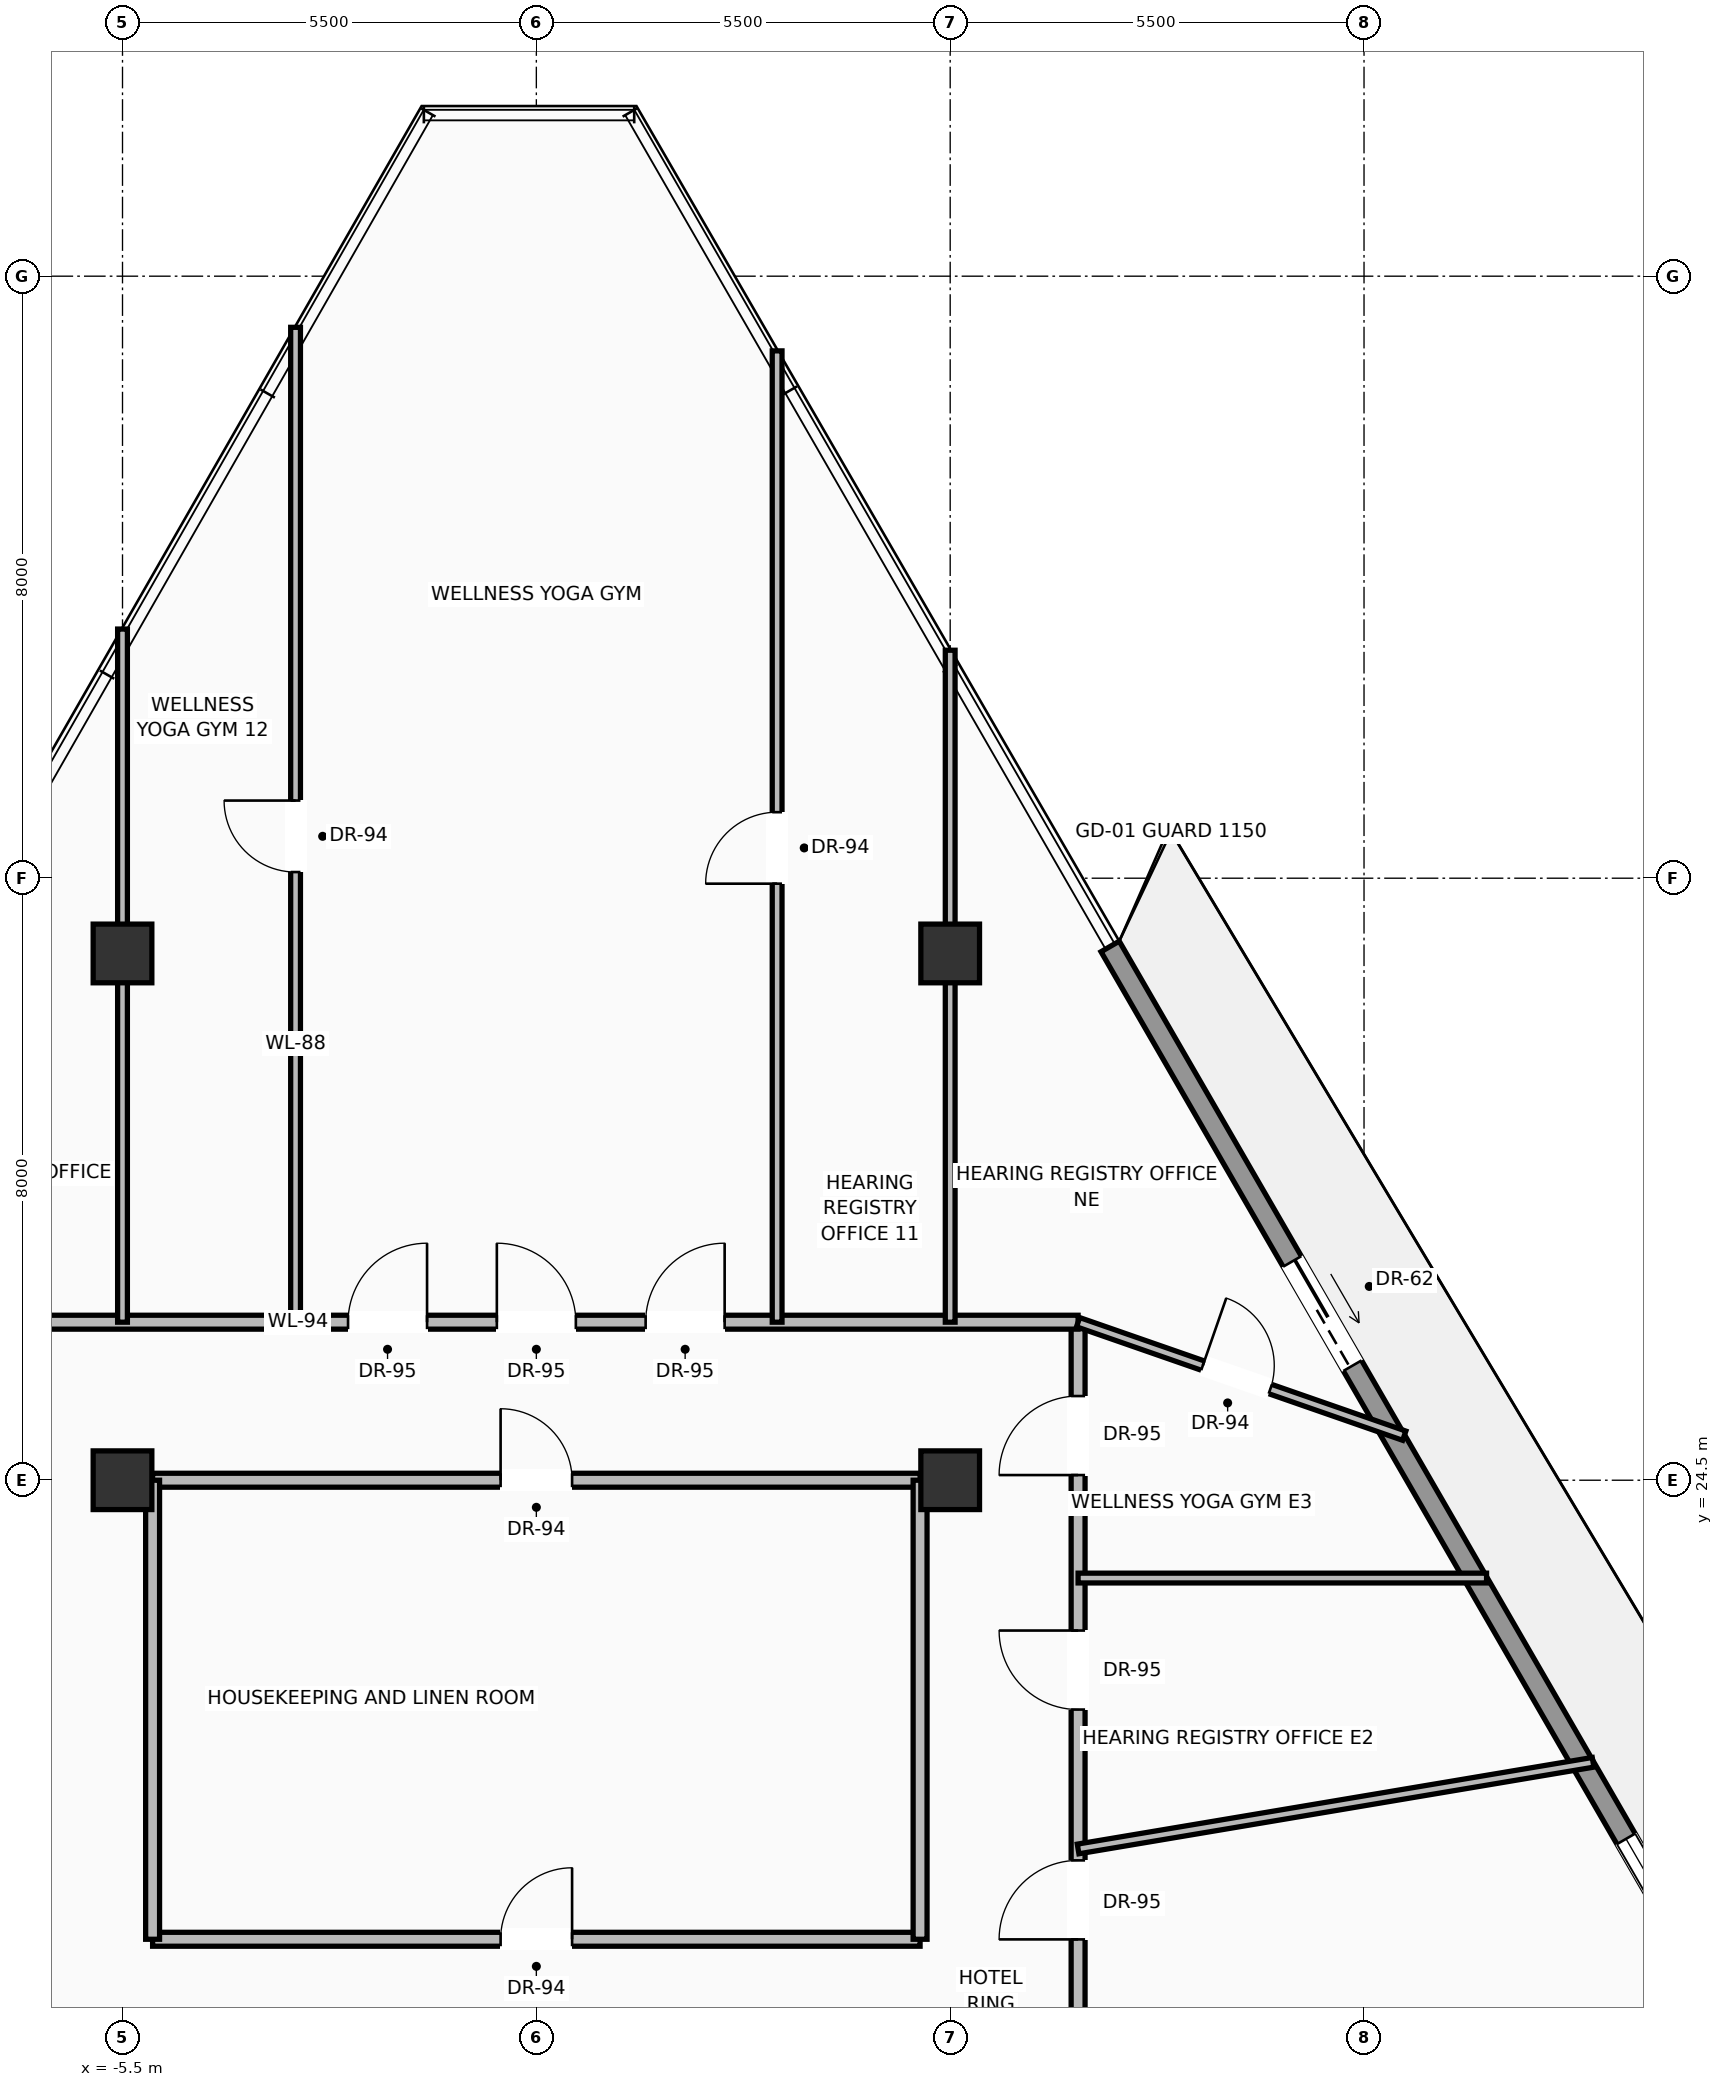
"""IFC4 building model, lengths in metres.
Left out: names, types, materials, properties, quantities, classifications, styles, units other than length and angle.
Written with IfcOpenShell. Run it as: python <this file> out.ifc"""

import sys

from ifc_helpers import new_model, si_unit, direction, frame, frame_2d, origin, origin_2d, place, context, subcontext, project, spatial, rectangle, extrude, source, transform, mapped, element, fill, save


model = new_model("IFC4")
c1 = context("Model", 3, precision=1e-05, world=origin(), true_north=direction((0.0, 1.0)))
c2 = subcontext(c1, "Body", "Model", "MODEL_VIEW")
j1 = project(units=[si_unit("LENGTHUNIT", "METRE"), si_unit("PLANEANGLEUNIT", "RADIAN")], contexts=[c1])
p1 = place(None, origin())
s1 = spatial("IfcSite", under=j1, at=p1, CompositionType="ELEMENT")
p2 = place(p1, origin())
s2 = spatial("IfcBuilding", under=s1, at=p2, CompositionType="ELEMENT")
p3 = place(p2, frame((0.0, 0.0, 293.7)))
s3 = spatial("IfcBuildingStorey", under=s2, at=p3, CompositionType="ELEMENT", Elevation=293.7)
m1 = source(origin(), c2, "Body", "SweptSolid", [
    extrude(rectangle(XDim=0.78, YDim=0.78, at=origin_2d()), origin(), (0.0, 0.0, 1.0), 3.45),
])
for number, where, z_axis, x_axis in (
    (1, (-5.5, 24.5, 0.0), (0.0, 0.0, 1.0), (1.0, 0.0, 0.0)),
    (2, (5.5, 24.5, 0.0), (0.0, 0.0, 1.0), (1.0, 0.0, 0.0)),
    (3, (-5.5, 31.5, 0.0), (0.0, 0.0, 1.0), (1.0, 0.0, 0.0)),
    (4, (5.5, 31.5, 0.0), (0.0, 0.0, 1.0), (1.0, 0.0, 0.0)),
):
    element("IfcColumn", number, at=place(p3, frame(where, z_axis=z_axis, x_axis=x_axis)), inside=s3, PredefinedType="COLUMN", context=c2, shape_type="MappedRepresentation", body=[
        mapped(m1, transform((0.0, 0.0, 0.0), scale=1.0)),
    ])
p4 = place(p3, frame((7.626, 31.593, 0.0), z_axis=(0.0, 0.0, 1.0), x_axis=(0.500533605719, -0.865717107112, 0.0)))
e5 = element("IfcWall", 5, at=p4, inside=s3, PredefinedType="SOLIDWALL", context=c2, shape_type="SweptSolid", body=[
    extrude(rectangle(XDim=20.145, YDim=0.28, at=frame_2d((10.072, 0.0))), origin(), (0.0, 0.0, 1.0), 2.82),
])
p5 = place(p4, frame((4.835, 0.0, 0.0)))
e6 = element("IfcOpeningElement", 6, at=p5, cuts=e5, PredefinedType="OPENING", context=c2, shape_type="SweptSolid", body=[
    extrude(rectangle(XDim=1.6, YDim=2.35, at=frame_2d((0.8, 1.175))), frame((0.0, 0.15, 0.0), z_axis=(0.0, -1.0, 0.0), x_axis=(1.0, 0.0, 0.0)), (0.0, 0.0, 1.0), 0.3),
])
p6 = place(p4, frame((13.698, 0.0, 0.9)))
e7 = element("IfcOpeningElement", 7, at=p6, cuts=e5, PredefinedType="OPENING", context=c2, shape_type="SweptSolid", body=[
    extrude(rectangle(XDim=1.55, YDim=1.75, at=frame_2d((0.775, 0.875))), frame((0.0, 0.15, 0.0), z_axis=(0.0, -1.0, 0.0), x_axis=(1.0, 0.0, 0.0)), (0.0, 0.0, 1.0), 0.3),
])
p7 = place(p3, frame((-5.1, 18.4, 0.0), z_axis=(0.0, 0.0, 1.0), x_axis=(1.0, 0.0, 0.0)))
e8 = element("IfcWall", 8, at=p7, inside=s3, PredefinedType="PARTITIONING", context=c2, shape_type="SweptSolid", body=[
    extrude(rectangle(XDim=10.2, YDim=0.185, at=frame_2d((5.1, 0.0))), origin(), (0.0, 0.0, 1.0), 3.232),
])
p8 = place(p7, frame((4.625, 0.0, 0.0)))
e9 = element("IfcOpeningElement", 9, at=p8, cuts=e8, PredefinedType="OPENING", context=c2, shape_type="SweptSolid", body=[
    extrude(rectangle(XDim=0.95, YDim=2.2, at=frame_2d((0.475, 1.1))), frame((0.0, 0.103, 0.0), z_axis=(0.0, -1.0, 0.0), x_axis=(1.0, 0.0, 0.0)), (0.0, 0.0, 1.0), 0.205),
])
p9 = place(p3, frame((-5.1, 24.5, 0.0), z_axis=(0.0, 0.0, 1.0), x_axis=(1.0, 0.0, 0.0)))
e10 = element("IfcWall", 10, at=p9, inside=s3, PredefinedType="PARTITIONING", context=c2, shape_type="SweptSolid", body=[
    extrude(rectangle(XDim=10.2, YDim=0.185, at=frame_2d((5.1, 0.0))), origin(), (0.0, 0.0, 1.0), 2.683),
])
p10 = place(p9, frame((4.625, 0.0, 0.0)))
e11 = element("IfcOpeningElement", 11, at=p10, cuts=e10, PredefinedType="OPENING", context=c2, shape_type="SweptSolid", body=[
    extrude(rectangle(XDim=0.95, YDim=2.2, at=frame_2d((0.475, 1.1))), frame((0.0, 0.103, 0.0), z_axis=(0.0, -1.0, 0.0), x_axis=(1.0, 0.0, 0.0)), (0.0, 0.0, 1.0), 0.205),
])
for number, where, z_axis, x_axis in (
    (12, (-5.1, 18.4, 0.0), (0.0, 0.0, 1.0), (0.0, 1.0, 0.0)),
    (13, (5.1, 18.4, 0.0), (0.0, 0.0, 1.0), (0.0, 1.0, 0.0)),
):
    element("IfcWall", number, at=place(p3, frame(where, z_axis=z_axis, x_axis=x_axis)), inside=s3, PredefinedType="PARTITIONING", context=c2, shape_type="SweptSolid", body=[
        extrude(rectangle(XDim=6.1, YDim=0.185, at=frame_2d((3.05, 0.0))), origin(), (0.0, 0.0, 1.0), 3.232),
    ])
p11 = place(p3, frame((7.2, 16.2, 0.0), z_axis=(0.0, 0.0, 1.0), x_axis=(0.0, 1.0, 0.0)))
e14 = element("IfcWall", 14, at=p11, inside=s3, PredefinedType="PARTITIONING", context=c2, shape_type="SweptSolid", body=[
    extrude(rectangle(XDim=10.4, YDim=0.185, at=frame_2d((5.2, 0.0))), origin(), (0.0, 0.0, 1.0), 3.232),
])
p12 = place(p11, frame((2.198, 0.0, 0.0)))
e15 = element("IfcOpeningElement", 15, at=p12, cuts=e14, PredefinedType="OPENING", context=c2, shape_type="SweptSolid", body=[
    extrude(rectangle(XDim=1.05, YDim=2.25, at=frame_2d((0.525, 1.125))), frame((0.0, 0.103, 0.0), z_axis=(0.0, -1.0, 0.0), x_axis=(1.0, 0.0, 0.0)), (0.0, 0.0, 1.0), 0.205),
])
p13 = place(p11, frame((5.252, 0.0, 0.0)))
e16 = element("IfcOpeningElement", 16, at=p13, cuts=e14, PredefinedType="OPENING", context=c2, shape_type="SweptSolid", body=[
    extrude(rectangle(XDim=1.05, YDim=2.25, at=frame_2d((0.525, 1.125))), frame((0.0, 0.103, 0.0), z_axis=(0.0, -1.0, 0.0), x_axis=(1.0, 0.0, 0.0)), (0.0, 0.0, 1.0), 0.205),
])
p14 = place(p11, frame((8.369, 0.0, 0.0)))
e17 = element("IfcOpeningElement", 17, at=p14, cuts=e14, PredefinedType="OPENING", context=c2, shape_type="SweptSolid", body=[
    extrude(rectangle(XDim=1.05, YDim=2.25, at=frame_2d((0.525, 1.125))), frame((0.0, 0.103, 0.0), z_axis=(0.0, -1.0, 0.0), x_axis=(1.0, 0.0, 0.0)), (0.0, 0.0, 1.0), 0.205),
])
p15 = place(p3, frame((-7.2, 26.6, 0.0), z_axis=(0.0, 0.0, 1.0), x_axis=(1.0, 0.0, 0.0)))
e18 = element("IfcWall", 18, at=p15, inside=s3, PredefinedType="PARTITIONING", context=c2, shape_type="SweptSolid", body=[
    extrude(rectangle(XDim=14.4, YDim=0.185, at=frame_2d((7.2, 0.0))), origin(), (0.0, 0.0, 1.0), 3.232),
])
p16 = place(p15, frame((4.698, 0.0, 0.0)))
e19 = element("IfcOpeningElement", 19, at=p16, cuts=e18, PredefinedType="OPENING", context=c2, shape_type="SweptSolid", body=[
    extrude(rectangle(XDim=1.05, YDim=2.25, at=frame_2d((0.525, 1.125))), frame((0.0, 0.103, 0.0), z_axis=(0.0, -1.0, 0.0), x_axis=(1.0, 0.0, 0.0)), (0.0, 0.0, 1.0), 0.205),
])
p17 = place(p15, frame((6.675, 0.0, 0.0)))
e20 = element("IfcOpeningElement", 20, at=p17, cuts=e18, PredefinedType="OPENING", context=c2, shape_type="SweptSolid", body=[
    extrude(rectangle(XDim=1.05, YDim=2.25, at=frame_2d((0.525, 1.125))), frame((0.0, 0.103, 0.0), z_axis=(0.0, -1.0, 0.0), x_axis=(1.0, 0.0, 0.0)), (0.0, 0.0, 1.0), 0.205),
])
p18 = place(p15, frame((8.653, 0.0, 0.0)))
e21 = element("IfcOpeningElement", 21, at=p18, cuts=e18, PredefinedType="OPENING", context=c2, shape_type="SweptSolid", body=[
    extrude(rectangle(XDim=1.05, YDim=2.25, at=frame_2d((0.525, 1.125))), frame((0.0, 0.103, 0.0), z_axis=(0.0, -1.0, 0.0), x_axis=(1.0, 0.0, 0.0)), (0.0, 0.0, 1.0), 0.205),
])
p19 = place(p3, frame((7.2, 26.6, 0.0), z_axis=(0.0, 0.0, 1.0), x_axis=(0.94445803841, -0.328632033866, 0.0)))
e22 = element("IfcWall", 22, at=p19, inside=s3, PredefinedType="PARTITIONING", context=c2, shape_type="SweptSolid", body=[
    extrude(rectangle(XDim=4.59, YDim=0.13, at=frame_2d((2.295, 0.0))), origin(), (0.0, 0.0, 1.0), 3.232),
])
p20 = place(p19, frame((1.755, 0.0, 0.0)))
e23 = element("IfcOpeningElement", 23, at=p20, cuts=e22, PredefinedType="OPENING", context=c2, shape_type="SweptSolid", body=[
    extrude(rectangle(XDim=0.95, YDim=2.2, at=frame_2d((0.475, 1.1))), frame((0.0, 0.075, 0.0), z_axis=(0.0, -1.0, 0.0), x_axis=(1.0, 0.0, 0.0)), (0.0, 0.0, 1.0), 0.15),
])
p21 = place(p3, frame((-5.5, 26.6, 0.0), z_axis=(0.0, 0.0, 1.0), x_axis=(0.0, 1.0, 0.0)))
e24 = element("IfcWall", 24, at=p21, inside=s3, PredefinedType="PARTITIONING", context=c2, shape_type="SweptSolid", body=[
    extrude(rectangle(XDim=9.211, YDim=0.13, at=frame_2d((4.605, 0.0))), origin(), (0.0, 0.0, 1.0), 2.683),
])
p22 = place(p3, frame((5.5, 26.6, 0.0), z_axis=(0.0, 0.0, 1.0), x_axis=(0.0, 1.0, 0.0)))
e25 = element("IfcWall", 25, at=p22, inside=s3, PredefinedType="PARTITIONING", context=c2, shape_type="SweptSolid", body=[
    extrude(rectangle(XDim=8.929, YDim=0.13, at=frame_2d((4.465, 0.0))), origin(), (0.0, 0.0, 1.0), 2.683),
])
p23 = place(p3, frame((-3.2, 26.6, 0.0), z_axis=(0.0, 0.0, 1.0), x_axis=(0.0, 1.0, 0.0)))
e26 = element("IfcWall", 26, at=p23, inside=s3, PredefinedType="PARTITIONING", context=c2, shape_type="SweptSolid", body=[
    extrude(rectangle(XDim=13.22, YDim=0.13, at=frame_2d((6.61, 0.0))), origin(), (0.0, 0.0, 1.0), 3.232),
])
p24 = place(p23, frame((5.982, 0.0, 0.0)))
e27 = element("IfcOpeningElement", 27, at=p24, cuts=e26, PredefinedType="OPENING", context=c2, shape_type="SweptSolid", body=[
    extrude(rectangle(XDim=0.95, YDim=2.2, at=frame_2d((0.475, 1.1))), frame((0.0, 0.075, 0.0), z_axis=(0.0, -1.0, 0.0), x_axis=(1.0, 0.0, 0.0)), (0.0, 0.0, 1.0), 0.15),
])
p25 = place(p3, frame((3.2, 26.6, 0.0), z_axis=(0.0, 0.0, 1.0), x_axis=(0.0, 1.0, 0.0)))
e28 = element("IfcWall", 28, at=p25, inside=s3, PredefinedType="PARTITIONING", context=c2, shape_type="SweptSolid", body=[
    extrude(rectangle(XDim=12.907, YDim=0.13, at=frame_2d((6.454, 0.0))), origin(), (0.0, 0.0, 1.0), 3.232),
])
p26 = place(p25, frame((5.827, 0.0, 0.0)))
e29 = element("IfcOpeningElement", 29, at=p26, cuts=e28, PredefinedType="OPENING", context=c2, shape_type="SweptSolid", body=[
    extrude(rectangle(XDim=0.95, YDim=2.2, at=frame_2d((0.475, 1.1))), frame((0.0, 0.075, 0.0), z_axis=(0.0, -1.0, 0.0), x_axis=(1.0, 0.0, 0.0)), (0.0, 0.0, 1.0), 0.15),
])
p27 = place(p3, frame((7.2, 19.6, 0.0), z_axis=(0.0, 0.0, 1.0), x_axis=(0.986143702521, 0.165893333134, 0.0)))
e30 = element("IfcWall", 30, at=p27, inside=s3, PredefinedType="PARTITIONING", context=c2, shape_type="SweptSolid", body=[
    extrude(rectangle(XDim=6.94, YDim=0.13, at=frame_2d((3.47, 0.0))), origin(), (0.0, 0.0, 1.0), 2.885),
])
p28 = place(p3, frame((7.2, 23.2, 0.0), z_axis=(0.0, 0.0, 1.0), x_axis=(1.0, 0.0, 0.0)))
e31 = element("IfcWall", 31, at=p28, inside=s3, PredefinedType="PARTITIONING", context=c2, shape_type="SweptSolid", body=[
    extrude(rectangle(XDim=5.428, YDim=0.13, at=frame_2d((2.714, 0.0))), origin(), (0.0, 0.0, 1.0), 3.232),
])
m2 = source(origin(), c2, "Body", "SweptSolid", [
    extrude(rectangle(XDim=1.6, YDim=2.35, at=frame_2d((0.8, 1.175))), frame((0.0, 0.025, 0.0), z_axis=(0.0, -1.0, 0.0), x_axis=(1.0, 0.0, 0.0)), (0.0, 0.0, 1.0), 0.05),
])
p29 = place(p5, origin())
e32 = element("IfcDoor", 32, at=p29, inside=s3, OperationType="SLIDING_TO_RIGHT", PredefinedType="DOOR", context=c2, shape_type="MappedRepresentation", body=[
    mapped(m2, transform((0.0, 0.0, 0.0), scale=1.0)),
])
fill(e6, e32)
m3 = source(origin(), c2, "Body", "SweptSolid", [
    extrude(rectangle(XDim=1.55, YDim=1.75, at=frame_2d((0.775, 0.875))), frame((0.0, 0.03, 0.0), z_axis=(0.0, -1.0, 0.0), x_axis=(1.0, 0.0, 0.0)), (0.0, 0.0, 1.0), 0.06),
])
p30 = place(p6, origin())
e33 = element("IfcWindow", 33, at=p30, inside=s3, PartitioningType="SINGLE_PANEL", PredefinedType="WINDOW", context=c2, shape_type="MappedRepresentation", body=[
    mapped(m3, transform((0.0, 0.0, 0.0), scale=1.0)),
])
fill(e7, e33)
m4 = source(origin(), c2, "Body", "SweptSolid", [
    extrude(rectangle(XDim=0.95, YDim=2.2, at=frame_2d((0.475, 1.1))), frame((0.0, 0.025, 0.0), z_axis=(0.0, -1.0, 0.0), x_axis=(1.0, 0.0, 0.0)), (0.0, 0.0, 1.0), 0.05),
])
p31 = place(p8, origin())
e34 = element("IfcDoor", 34, at=p31, inside=s3, OperationType="SINGLE_SWING_RIGHT", PredefinedType="DOOR", context=c2, shape_type="MappedRepresentation", body=[
    mapped(m4, transform((0.0, 0.0, 0.0), scale=1.0)),
])
fill(e9, e34)
p32 = place(p10, origin())
e35 = element("IfcDoor", 35, at=p32, inside=s3, OperationType="SINGLE_SWING_LEFT", PredefinedType="DOOR", context=c2, shape_type="MappedRepresentation", body=[
    mapped(m4, transform((0.0, 0.0, 0.0), scale=1.0)),
])
fill(e11, e35)
m5 = source(origin(), c2, "Body", "SweptSolid", [
    extrude(rectangle(XDim=1.05, YDim=2.25, at=frame_2d((0.525, 1.125))), frame((0.0, 0.025, 0.0), z_axis=(0.0, -1.0, 0.0), x_axis=(1.0, 0.0, 0.0)), (0.0, 0.0, 1.0), 0.05),
])
p33 = place(p12, origin())
e36 = element("IfcDoor", 36, at=p33, inside=s3, OperationType="SINGLE_SWING_LEFT", PredefinedType="DOOR", context=c2, shape_type="MappedRepresentation", body=[
    mapped(m5, transform((0.0, 0.0, 0.0), scale=1.0)),
])
fill(e15, e36)
p34 = place(p13, origin())
e37 = element("IfcDoor", 37, at=p34, inside=s3, OperationType="SINGLE_SWING_RIGHT", PredefinedType="DOOR", context=c2, shape_type="MappedRepresentation", body=[
    mapped(m5, transform((0.0, 0.0, 0.0), scale=1.0)),
])
fill(e16, e37)
p35 = place(p14, origin())
e38 = element("IfcDoor", 38, at=p35, inside=s3, OperationType="SINGLE_SWING_LEFT", PredefinedType="DOOR", context=c2, shape_type="MappedRepresentation", body=[
    mapped(m5, transform((0.0, 0.0, 0.0), scale=1.0)),
])
fill(e17, e38)
p36 = place(p16, origin())
e39 = element("IfcDoor", 39, at=p36, inside=s3, OperationType="SINGLE_SWING_RIGHT", PredefinedType="DOOR", context=c2, shape_type="MappedRepresentation", body=[
    mapped(m5, transform((0.0, 0.0, 0.0), scale=1.0)),
])
fill(e19, e39)
p37 = place(p17, origin())
e40 = element("IfcDoor", 40, at=p37, inside=s3, OperationType="SINGLE_SWING_LEFT", PredefinedType="DOOR", context=c2, shape_type="MappedRepresentation", body=[
    mapped(m5, transform((0.0, 0.0, 0.0), scale=1.0)),
])
fill(e20, e40)
p38 = place(p18, origin())
e41 = element("IfcDoor", 41, at=p38, inside=s3, OperationType="SINGLE_SWING_RIGHT", PredefinedType="DOOR", context=c2, shape_type="MappedRepresentation", body=[
    mapped(m5, transform((0.0, 0.0, 0.0), scale=1.0)),
])
fill(e21, e41)
p39 = place(p20, origin())
e42 = element("IfcDoor", 42, at=p39, inside=s3, OperationType="SINGLE_SWING_LEFT", PredefinedType="DOOR", context=c2, shape_type="MappedRepresentation", body=[
    mapped(m4, transform((0.0, 0.0, 0.0), scale=1.0)),
])
fill(e23, e42)
p40 = place(p26, origin())
e43 = element("IfcDoor", 43, at=p40, inside=s3, OperationType="SINGLE_SWING_LEFT", PredefinedType="DOOR", context=c2, shape_type="MappedRepresentation", body=[
    mapped(m4, transform((0.0, 0.0, 0.0), scale=1.0)),
])
fill(e29, e43)
p41 = place(p24, origin())
e44 = element("IfcDoor", 44, at=p41, inside=s3, OperationType="SINGLE_SWING_RIGHT", PredefinedType="DOOR", context=c2, shape_type="MappedRepresentation", body=[
    mapped(m4, transform((0.0, 0.0, 0.0), scale=1.0)),
])
fill(e27, e44)
save(model, sys.argv[1])
